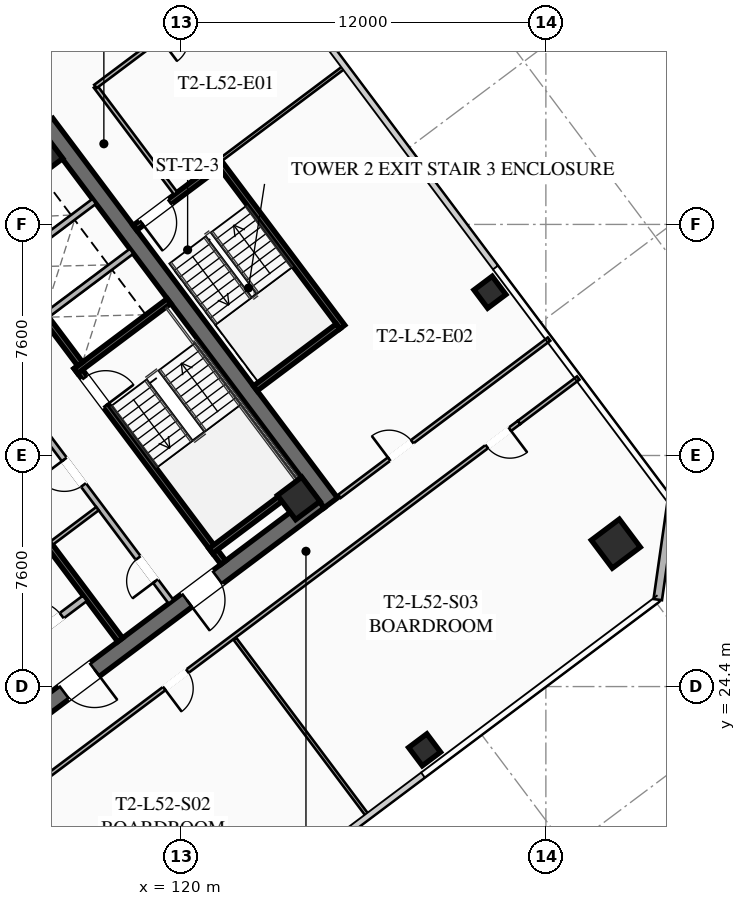
"""IFC4 building model, lengths in metres.
Left out: names, types, materials, properties, quantities, classifications, styles, units other than length and angle.
Written with IfcOpenShell. Run it as: python <this file> out.ifc"""

import sys

from ifc_helpers import new_model, si_unit, direction, frame, frame_2d, origin, origin_2d, place, context, subcontext, project, spatial, rectangle, hollow_rectangle, extrude, element, fill, save


model = new_model("IFC4")
c1 = context("Model", 3, precision=1e-05, world=origin(), true_north=direction((0.0, 1.0)))
c2 = subcontext(c1, "Body", "Model", "MODEL_VIEW")
j1 = project(units=[si_unit("LENGTHUNIT", "METRE"), si_unit("PLANEANGLEUNIT", "RADIAN")], contexts=[c1])
p1 = place(None, origin())
s1 = spatial("IfcSite", under=j1, at=p1, CompositionType="ELEMENT")
p2 = place(p1, origin())
s2 = spatial("IfcBuilding", under=s1, at=p2, CompositionType="ELEMENT")
p3 = place(p2, frame((0.0, 0.0, 192.5)))
s3 = spatial("IfcBuildingStorey", under=s2, at=p3, CompositionType="ELEMENT", Elevation=192.5)
p4 = place(p3, frame((115.564, 42.923, 0.0), z_axis=(0.0, 0.0, 1.0), x_axis=(0.600005007985, -0.799996243986, 0.0)))
e1 = element("IfcWall", 1, at=p4, inside=s3, PredefinedType="SHEAR", context=c2, shape_type="SweptSolid", body=[
    extrude(rectangle(XDim=15.6, YDim=0.55, at=frame_2d((7.8, 0.0))), origin(), (0.0, 0.0, 1.0), 3.55),
])
p5 = place(p3, frame((124.539, 30.498, 0.0), z_axis=(0.0, 0.0, 1.0), x_axis=(-0.799998054672, -0.600002593761, 0.0)))
e2 = element("IfcWall", 2, at=p5, inside=s3, PredefinedType="SHEAR", context=c2, shape_type="SweptSolid", body=[
    extrude(rectangle(XDim=15.06, YDim=0.55, at=frame_2d((7.53, 0.0))), origin(), (0.0, 0.0, 1.0), 3.55),
])
p6 = place(p5, frame((9.23, 0.0, 0.0)))
e3 = element("IfcOpeningElement", 3, at=p6, cuts=e2, PredefinedType="OPENING", context=c2, shape_type="SweptSolid", body=[
    extrude(rectangle(XDim=1.25, YDim=2.25, at=frame_2d((0.625, 1.125))), frame((0.0, 0.285, 0.0), z_axis=(0.0, -1.0, 0.0), x_axis=(1.0, 0.0, 0.0)), (0.0, 0.0, 1.0), 0.57),
])
p7 = place(p5, frame((4.18, 0.0, 0.0)))
e4 = element("IfcOpeningElement", 4, at=p7, cuts=e2, PredefinedType="OPENING", context=c2, shape_type="SweptSolid", body=[
    extrude(rectangle(XDim=1.25, YDim=2.25, at=frame_2d((0.625, 1.125))), frame((0.0, 0.285, 0.0), z_axis=(0.0, -1.0, 0.0), x_axis=(1.0, 0.0, 0.0)), (0.0, 0.0, 1.0), 0.57),
])
for number, where, z_axis, x_axis in (
    (5, (123.87, 30.59, 0.0), (0.0, 0.0, 1.0), (0.8, 0.6, 0.0)),
    (6, (115.41, 41.87, 0.0), (0.0, 0.0, 1.0), (0.8, 0.6, 0.0)),
):
    element("IfcColumn", number, at=place(p3, frame(where, z_axis=z_axis, x_axis=x_axis)), inside=s3, PredefinedType="COLUMN", context=c2, shape_type="SweptSolid", body=[
        extrude(hollow_rectangle(XDim=1.0, YDim=1.0, WallThickness=0.04, at=origin_2d()), origin(), (0.0, 0.0, 1.0), 3.37),
    ])
p8 = place(p3, frame((134.3, 29.1, 0.0), z_axis=(0.0, 0.0, 1.0), x_axis=(0.799999996291, 0.600000004945, 0.0)))
e7 = element("IfcColumn", 7, at=p8, inside=s3, PredefinedType="COLUMN", context=c2, shape_type="SweptSolid", body=[
    extrude(hollow_rectangle(XDim=1.15, YDim=1.15, WallThickness=0.045, at=origin_2d()), origin(), (0.0, 0.0, 1.0), 3.37),
])
for number, where, z_axis, x_axis in (
    (8, (128.01, 22.32, 0.0), (0.0, 0.0, 1.0), (0.8, 0.6, 0.0)),
    (9, (130.16, 37.37, 0.0), (0.0, 0.0, 1.0), (0.8, 0.6, 0.0)),
):
    element("IfcColumn", number, at=place(p3, frame(where, z_axis=z_axis, x_axis=x_axis)), inside=s3, PredefinedType="COLUMN", context=c2, shape_type="SweptSolid", body=[
        extrude(hollow_rectangle(XDim=0.75, YDim=0.75, WallThickness=0.032, at=origin_2d()), origin(), (0.0, 0.0, 1.0), 3.37),
    ])
p9 = place(p3, frame((136.14, 30.48, 0.0), z_axis=(0.0, 0.0, 1.0), x_axis=(-0.141410847992, -0.989950994782, 0.0)))
e10 = element("IfcWall", 10, at=p9, inside=s3, PredefinedType="SOLIDWALL", context=c2, shape_type="SweptSolid", body=[
    extrude(rectangle(XDim=3.253, YDim=0.28, at=frame_2d((1.626, 0.0))), origin(), (0.0, 0.0, 1.0), 3.37),
])
p10 = place(p3, frame((116.56, 34.92, 0.0), z_axis=(0.0, 0.0, 1.0), x_axis=(0.59999029481, -0.8000072788, 0.0)))
e11 = element("IfcWall", 11, at=p10, inside=s3, PredefinedType="SHEAR", context=c2, shape_type="SweptSolid", body=[
    extrude(rectangle(XDim=8.05, YDim=0.2, at=frame_2d((4.025, 0.0))), origin(), (0.0, 0.0, 1.0), 3.37),
])
p11 = place(p10, frame((0.45, 0.0, 0.0)))
e12 = element("IfcOpeningElement", 12, at=p11, cuts=e11, PredefinedType="OPENING", context=c2, shape_type="SweptSolid", body=[
    extrude(rectangle(XDim=1.15, YDim=2.2, at=frame_2d((0.575, 1.1))), frame((0.0, 0.11, 0.0), z_axis=(0.0, -1.0, 0.0), x_axis=(1.0, 0.0, 0.0)), (0.0, 0.0, 1.0), 0.22),
])
for number, where, z_axis, x_axis in (
    (13, (116.54, 34.78, 0.0), (0.0, 0.0, 1.0), (0.8, 0.6, 0.0)),
    (14, (120.98, 28.86, 0.0), (0.0, 0.0, 1.0), (0.8, 0.6, 0.0)),
):
    element("IfcWall", number, at=place(p3, frame(where, z_axis=z_axis, x_axis=x_axis)), inside=s3, PredefinedType="SHEAR", context=c2, shape_type="SweptSolid", body=[
        extrude(rectangle(XDim=3.83, YDim=0.2, at=frame_2d((1.915, 0.0))), origin(), (0.0, 0.0, 1.0), 3.37),
    ])
p12 = place(p3, frame((117.998, 25.936, 0.0), z_axis=(0.0, 0.0, 1.0), x_axis=(-0.600002693989, 0.799997979501, 0.0)))
e15 = element("IfcWall", 15, at=p12, inside=s3, PredefinedType="SHEAR", context=c2, shape_type="SweptSolid", body=[
    extrude(rectangle(XDim=14.5, YDim=0.2, at=frame_2d((7.25, 0.0))), origin(), (0.0, 0.0, 1.0), 3.37),
])
p13 = place(p3, frame((114.316, 25.412, 0.0), z_axis=(0.0, 0.0, 1.0), x_axis=(0.800018601094, 0.59997519774, 0.0)))
e16 = element("IfcWall", 16, at=p13, inside=s3, PredefinedType="SOLIDWALL", context=c2, shape_type="SweptSolid", body=[
    extrude(rectangle(XDim=3.15, YDim=0.22, at=frame_2d((1.575, 0.0))), origin(), (0.0, 0.0, 1.0), 2.723),
])
p14 = place(p13, frame((0.95, 0.0, 0.0)))
e17 = element("IfcOpeningElement", 17, at=p14, cuts=e16, PredefinedType="OPENING", context=c2, shape_type="SweptSolid", body=[
    extrude(rectangle(XDim=1.25, YDim=2.25, at=frame_2d((0.625, 1.125))), frame((0.0, 0.12, 0.0), z_axis=(0.0, -1.0, 0.0), x_axis=(1.0, 0.0, 0.0)), (0.0, 0.0, 1.0), 0.24),
])
p15 = place(p3, frame((112.81, 40.17, 0.0), z_axis=(0.0, 0.0, 1.0), x_axis=(0.599993943644, -0.800004542231, 0.0)))
e18 = element("IfcWall", 18, at=p15, inside=s3, PredefinedType="SHEAR", context=c2, shape_type="SweptSolid", body=[
    extrude(rectangle(XDim=6.45, YDim=0.2, at=frame_2d((3.225, 0.0))), origin(), (0.0, 0.0, 1.0), 3.37),
])
for number, where, z_axis, x_axis in (
    (19, (115.59, 36.63, 0.0), (0.0, 0.0, 1.0), (0.8, 0.6, 0.0)),
    (20, (114.36, 38.27, 0.0), (0.0, 0.0, 1.0), (0.8, 0.6, 0.0)),
):
    element("IfcWall", number, at=place(p3, frame(where, z_axis=z_axis, x_axis=x_axis)), inside=s3, PredefinedType="SOLIDWALL", context=c2, shape_type="SweptSolid", body=[
        extrude(rectangle(XDim=3.48, YDim=0.2, at=frame_2d((1.74, 0.0))), origin(), (0.0, 0.0, 1.0), 3.37),
    ])
p16 = place(p3, frame((119.67, 27.19, 0.0), z_axis=(0.0, 0.0, 1.0), x_axis=(-0.599988677396, 0.800008491828, 0.0)))
e21 = element("IfcWall", 21, at=p16, inside=s3, PredefinedType="SOLIDWALL", context=c2, shape_type="SweptSolid", body=[
    extrude(rectangle(XDim=6.9, YDim=0.2, at=frame_2d((3.45, 0.0))), origin(), (0.0, 0.0, 1.0), 2.723),
])
p17 = place(p16, frame((0.85, 0.0, 0.0)))
e22 = element("IfcOpeningElement", 22, at=p17, cuts=e21, PredefinedType="OPENING", context=c2, shape_type="SweptSolid", body=[
    extrude(rectangle(XDim=0.95, YDim=2.05, at=frame_2d((0.475, 1.025))), frame((0.0, 0.11, 0.0), z_axis=(0.0, -1.0, 0.0), x_axis=(1.0, 0.0, 0.0)), (0.0, 0.0, 1.0), 0.22),
])
p18 = place(p16, frame((4.8, 0.0, 0.0)))
e23 = element("IfcOpeningElement", 23, at=p18, cuts=e21, PredefinedType="OPENING", context=c2, shape_type="SweptSolid", body=[
    extrude(rectangle(XDim=1.05, YDim=2.2, at=frame_2d((0.525, 1.1))), frame((0.0, 0.11, 0.0), z_axis=(0.0, -1.0, 0.0), x_axis=(1.0, 0.0, 0.0)), (0.0, 0.0, 1.0), 0.22),
])
p19 = place(p3, frame((115.746, 29.122, 0.0), z_axis=(0.0, 0.0, 1.0), x_axis=(0.8, 0.6, 0.0)))
e24 = element("IfcWall", 24, at=p19, inside=s3, PredefinedType="PARTITIONING", context=c2, shape_type="SweptSolid", body=[
    extrude(rectangle(XDim=1.88, YDim=0.135, at=frame_2d((0.94, 0.0))), origin(), (0.0, 0.0, 1.0), 2.723),
])
p20 = place(p3, frame((125.304, 36.228, 0.0), z_axis=(0.0, 0.0, 1.0), x_axis=(-0.59998851072, 0.800008616831, 0.0)))
e25 = element("IfcWall", 25, at=p20, inside=s3, PredefinedType="SHEAR", context=c2, shape_type="SweptSolid", body=[
    extrude(rectangle(XDim=6.8, YDim=0.2, at=frame_2d((3.4, 0.0))), origin(), (0.0, 0.0, 1.0), 3.37),
])
p21 = place(p3, frame((121.204, 41.528, 0.0), z_axis=(0.0, 0.0, 1.0), x_axis=(-0.800017232136, -0.599977023131, 0.0)))
e26 = element("IfcWall", 26, at=p21, inside=s3, PredefinedType="SHEAR", context=c2, shape_type="SweptSolid", body=[
    extrude(rectangle(XDim=3.4, YDim=0.2, at=frame_2d((1.7, 0.0))), origin(), (0.0, 0.0, 1.0), 3.37),
])
p22 = place(p21, frame((1.975, 0.0, 0.0)))
e27 = element("IfcOpeningElement", 27, at=p22, cuts=e26, PredefinedType="OPENING", context=c2, shape_type="SweptSolid", body=[
    extrude(rectangle(XDim=1.15, YDim=2.2, at=frame_2d((0.575, 1.1))), frame((0.0, 0.11, 0.0), z_axis=(0.0, -1.0, 0.0), x_axis=(1.0, 0.0, 0.0)), (0.0, 0.0, 1.0), 0.22),
])
p23 = place(p3, frame((122.444, 34.208, 0.0), z_axis=(0.0, 0.0, 1.0), x_axis=(0.79999138319, 0.600011488909, 0.0)))
e28 = element("IfcWall", 28, at=p23, inside=s3, PredefinedType="SHEAR", context=c2, shape_type="SweptSolid", body=[
    extrude(rectangle(XDim=3.4, YDim=0.2, at=frame_2d((1.7, 0.0))), origin(), (0.0, 0.0, 1.0), 3.37),
])
p24 = place(p3, frame((119.824, 40.618, 0.0), z_axis=(0.0, 0.0, 1.0), x_axis=(-0.599982243973, 0.800013316712, 0.0)))
e29 = element("IfcWall", 29, at=p24, inside=s3, PredefinedType="PARTITIONING", context=c2, shape_type="SweptSolid", body=[
    extrude(rectangle(XDim=4.4, YDim=0.135, at=frame_2d((2.2, 0.0))), origin(), (0.0, 0.0, 1.0), 2.723),
])
p25 = place(p3, frame((96.718, 31.126, 0.0), z_axis=(0.0, 0.0, 1.0), x_axis=(0.8, 0.6, 0.0)))
e30 = element("IfcWall", 30, at=p25, inside=s3, PredefinedType="PARTITIONING", context=c2, shape_type="SweptSolid", body=[
    extrude(rectangle(XDim=28.7, YDim=0.135, at=frame_2d((14.35, 0.0))), origin(), (0.0, 0.0, 1.0), 2.723),
])
p26 = place(p25, frame((0.3, 0.0, 0.0)))
e31 = element("IfcOpeningElement", 31, at=p26, cuts=e30, PredefinedType="OPENING", context=c2, shape_type="SweptSolid", body=[
    extrude(rectangle(XDim=0.95, YDim=2.05, at=frame_2d((0.475, 1.025))), frame((0.0, 0.077, 0.0), z_axis=(0.0, -1.0, 0.0), x_axis=(1.0, 0.0, 0.0)), (0.0, 0.0, 1.0), 0.155),
])
p27 = place(p25, frame((14.138, 0.0, 0.0)))
e32 = element("IfcOpeningElement", 32, at=p27, cuts=e30, PredefinedType="OPENING", context=c2, shape_type="SweptSolid", body=[
    extrude(rectangle(XDim=0.95, YDim=2.05, at=frame_2d((0.475, 1.025))), frame((0.0, 0.077, 0.0), z_axis=(0.0, -1.0, 0.0), x_axis=(1.0, 0.0, 0.0)), (0.0, 0.0, 1.0), 0.155),
])
p28 = place(p25, frame((27.45, 0.0, 0.0)))
e33 = element("IfcOpeningElement", 33, at=p28, cuts=e30, PredefinedType="OPENING", context=c2, shape_type="SweptSolid", body=[
    extrude(rectangle(XDim=0.95, YDim=2.05, at=frame_2d((0.475, 1.025))), frame((0.0, 0.077, 0.0), z_axis=(0.0, -1.0, 0.0), x_axis=(1.0, 0.0, 0.0)), (0.0, 0.0, 1.0), 0.155),
])
p29 = place(p3, frame((131.12, 33.09, 0.0), z_axis=(0.0, 0.0, 1.0), x_axis=(-0.800003062365, -0.599995916825, 0.0)))
e34 = element("IfcWall", 34, at=p29, inside=s3, PredefinedType="PARTITIONING", context=c2, shape_type="SweptSolid", body=[
    extrude(rectangle(XDim=28.7, YDim=0.135, at=frame_2d((14.35, 0.0))), origin(), (0.0, 0.0, 1.0), 2.723),
])
p30 = place(p29, frame((27.37, 0.0, 0.0)))
e35 = element("IfcOpeningElement", 35, at=p30, cuts=e34, PredefinedType="OPENING", context=c2, shape_type="SweptSolid", body=[
    extrude(rectangle(XDim=0.95, YDim=2.05, at=frame_2d((0.475, 1.025))), frame((0.0, 0.077, 0.0), z_axis=(0.0, -1.0, 0.0), x_axis=(1.0, 0.0, 0.0)), (0.0, 0.0, 1.0), 0.155),
])
p31 = place(p29, frame((13.638, 0.0, 0.0)))
e36 = element("IfcOpeningElement", 36, at=p31, cuts=e34, PredefinedType="OPENING", context=c2, shape_type="SweptSolid", body=[
    extrude(rectangle(XDim=0.95, YDim=2.05, at=frame_2d((0.475, 1.025))), frame((0.0, 0.077, 0.0), z_axis=(0.0, -1.0, 0.0), x_axis=(1.0, 0.0, 0.0)), (0.0, 0.0, 1.0), 0.155),
])
p32 = place(p29, frame((0.38, 0.0, 0.0)))
e37 = element("IfcOpeningElement", 37, at=p32, cuts=e34, PredefinedType="OPENING", context=c2, shape_type="SweptSolid", body=[
    extrude(rectangle(XDim=0.95, YDim=2.05, at=frame_2d((0.475, 1.025))), frame((0.0, 0.077, 0.0), z_axis=(0.0, -1.0, 0.0), x_axis=(1.0, 0.0, 0.0)), (0.0, 0.0, 1.0), 0.155),
])
p33 = place(p3, frame((131.12, 33.09, 0.0), z_axis=(0.0, 0.0, 1.0), x_axis=(0.799975885537, 0.600032151272, 0.0)))
e38 = element("IfcWall", 38, at=p33, inside=s3, PredefinedType="PARTITIONING", context=c2, shape_type="SweptSolid", body=[
    extrude(rectangle(XDim=2.43, YDim=0.135, at=frame_2d((1.215, 0.0))), origin(), (0.0, 0.0, 1.0), 2.723),
])
p34 = place(p3, frame((118.948, 14.736, 0.0), z_axis=(0.0, 0.0, 1.0), x_axis=(-0.6, 0.8, 0.0)))
e39 = element("IfcWall", 39, at=p34, inside=s3, PredefinedType="PARTITIONING", context=c2, shape_type="SweptSolid", body=[
    extrude(rectangle(XDim=7.3, YDim=0.11, at=frame_2d((3.65, 0.0))), origin(), (0.0, 0.0, 1.0), 2.723),
])
p35 = place(p3, frame((126.148, 20.136, 0.0), z_axis=(0.0, 0.0, 1.0), x_axis=(-0.599983946797, 0.800012039651, 0.0)))
e40 = element("IfcWall", 40, at=p35, inside=s3, PredefinedType="PARTITIONING", context=c2, shape_type="SweptSolid", body=[
    extrude(rectangle(XDim=7.3, YDim=0.11, at=frame_2d((3.65, 0.0))), origin(), (0.0, 0.0, 1.0), 2.723),
])
p36 = place(p3, frame((122.744, 48.308, 0.0), z_axis=(0.0, 0.0, 1.0), x_axis=(-0.79997892247, -0.600028102345, 0.0)))
e41 = element("IfcWall", 41, at=p36, inside=s3, PredefinedType="PARTITIONING", context=c2, shape_type="SweptSolid", body=[
    extrude(rectangle(XDim=6.95, YDim=0.135, at=frame_2d((3.475, 0.0))), origin(), (0.0, 0.0, 1.0), 2.723),
])
p37 = place(p36, frame((3.35, 0.0, 0.0)))
e42 = element("IfcOpeningElement", 42, at=p37, cuts=e41, PredefinedType="OPENING", context=c2, shape_type="SweptSolid", body=[
    extrude(rectangle(XDim=0.95, YDim=2.05, at=frame_2d((0.475, 1.025))), frame((0.0, 0.077, 0.0), z_axis=(0.0, -1.0, 0.0), x_axis=(1.0, 0.0, 0.0)), (0.0, 0.0, 1.0), 0.155),
])
p38 = place(p3, frame((125.208, 30.656, 0.0), z_axis=(0.0, 0.0, 1.0), x_axis=(0.800006797429, 0.599990936654, 0.0)))
e43 = element("IfcWall", 43, at=p38, inside=s3, PredefinedType="PARTITIONING", context=c2, shape_type="SweptSolid", body=[
    extrude(rectangle(XDim=8.62, YDim=0.135, at=frame_2d((4.31, 0.0))), origin(), (0.0, 0.0, 1.0), 2.723),
])
p39 = place(p38, frame((2.045, 0.0, 0.0)))
e44 = element("IfcOpeningElement", 44, at=p39, cuts=e43, PredefinedType="OPENING", context=c2, shape_type="SweptSolid", body=[
    extrude(rectangle(XDim=0.95, YDim=2.05, at=frame_2d((0.475, 1.025))), frame((0.0, 0.077, 0.0), z_axis=(0.0, -1.0, 0.0), x_axis=(1.0, 0.0, 0.0)), (0.0, 0.0, 1.0), 0.155),
])
p40 = place(p3, frame((125.384, 44.788, 0.0), z_axis=(0.0, 0.0, 1.0), x_axis=(-0.8, -0.6, 0.0)))
e45 = element("IfcWall", 45, at=p40, inside=s3, PredefinedType="PARTITIONING", context=c2, shape_type="SweptSolid", body=[
    extrude(rectangle(XDim=5.1, YDim=0.11, at=frame_2d((2.55, 0.0))), origin(), (0.0, 0.0, 1.0), 2.723),
])
p41 = place(p6, origin())
e46 = element("IfcDoor", 46, at=p41, inside=s3, OperationType="SINGLE_SWING_LEFT", PredefinedType="DOOR", context=c2, shape_type="SweptSolid", body=[
    extrude(rectangle(XDim=1.25, YDim=2.25, at=frame_2d((0.625, 1.125))), frame((0.0, 0.025, 0.0), z_axis=(0.0, -1.0, 0.0), x_axis=(1.0, 0.0, 0.0)), (0.0, 0.0, 1.0), 0.05),
])
fill(e3, e46)
p42 = place(p7, origin())
e47 = element("IfcDoor", 47, at=p42, inside=s3, OperationType="SINGLE_SWING_RIGHT", PredefinedType="DOOR", context=c2, shape_type="SweptSolid", body=[
    extrude(rectangle(XDim=1.25, YDim=2.25, at=frame_2d((0.625, 1.125))), frame((0.0, 0.025, 0.0), z_axis=(0.0, -1.0, 0.0), x_axis=(1.0, 0.0, 0.0)), (0.0, 0.0, 1.0), 0.05),
])
fill(e4, e47)
p43 = place(p11, origin())
e48 = element("IfcDoor", 48, at=p43, inside=s3, OperationType="SINGLE_SWING_RIGHT", PredefinedType="DOOR", context=c2, shape_type="SweptSolid", body=[
    extrude(rectangle(XDim=1.15, YDim=2.2, at=frame_2d((0.575, 1.1))), frame((0.0, 0.025, 0.0), z_axis=(0.0, -1.0, 0.0), x_axis=(1.0, 0.0, 0.0)), (0.0, 0.0, 1.0), 0.05),
])
fill(e12, e48)
p44 = place(p14, origin())
e49 = element("IfcDoor", 49, at=p44, inside=s3, OperationType="SINGLE_SWING_LEFT", PredefinedType="DOOR", context=c2, shape_type="SweptSolid", body=[
    extrude(rectangle(XDim=1.25, YDim=2.25, at=frame_2d((0.625, 1.125))), frame((0.0, 0.025, 0.0), z_axis=(0.0, -1.0, 0.0), x_axis=(1.0, 0.0, 0.0)), (0.0, 0.0, 1.0), 0.05),
])
fill(e17, e49)
p45 = place(p17, origin())
e50 = element("IfcDoor", 50, at=p45, inside=s3, OperationType="SINGLE_SWING_LEFT", PredefinedType="DOOR", context=c2, shape_type="SweptSolid", body=[
    extrude(rectangle(XDim=0.95, YDim=2.05, at=frame_2d((0.475, 1.025))), frame((0.0, 0.025, 0.0), z_axis=(0.0, -1.0, 0.0), x_axis=(1.0, 0.0, 0.0)), (0.0, 0.0, 1.0), 0.05),
])
fill(e22, e50)
p46 = place(p18, origin())
e51 = element("IfcDoor", 51, at=p46, inside=s3, OperationType="SINGLE_SWING_RIGHT", PredefinedType="DOOR", context=c2, shape_type="SweptSolid", body=[
    extrude(rectangle(XDim=1.05, YDim=2.2, at=frame_2d((0.525, 1.1))), frame((0.0, 0.025, 0.0), z_axis=(0.0, -1.0, 0.0), x_axis=(1.0, 0.0, 0.0)), (0.0, 0.0, 1.0), 0.05),
])
fill(e23, e51)
p47 = place(p22, origin())
e52 = element("IfcDoor", 52, at=p47, inside=s3, OperationType="SINGLE_SWING_RIGHT", PredefinedType="DOOR", context=c2, shape_type="SweptSolid", body=[
    extrude(rectangle(XDim=1.15, YDim=2.2, at=frame_2d((0.575, 1.1))), frame((0.0, 0.025, 0.0), z_axis=(0.0, -1.0, 0.0), x_axis=(1.0, 0.0, 0.0)), (0.0, 0.0, 1.0), 0.05),
])
fill(e27, e52)
p48 = place(p31, origin())
e53 = element("IfcDoor", 53, at=p48, inside=s3, OperationType="SINGLE_SWING_RIGHT", PredefinedType="DOOR", context=c2, shape_type="SweptSolid", body=[
    extrude(rectangle(XDim=0.95, YDim=2.05, at=frame_2d((0.475, 1.025))), frame((0.0, 0.025, 0.0), z_axis=(0.0, -1.0, 0.0), x_axis=(1.0, 0.0, 0.0)), (0.0, 0.0, 1.0), 0.05),
])
fill(e36, e53)
p49 = place(p32, origin())
e54 = element("IfcDoor", 54, at=p49, inside=s3, OperationType="SINGLE_SWING_LEFT", PredefinedType="DOOR", context=c2, shape_type="SweptSolid", body=[
    extrude(rectangle(XDim=0.95, YDim=2.05, at=frame_2d((0.475, 1.025))), frame((0.0, 0.025, 0.0), z_axis=(0.0, -1.0, 0.0), x_axis=(1.0, 0.0, 0.0)), (0.0, 0.0, 1.0), 0.05),
])
fill(e37, e54)
p50 = place(p39, origin())
e55 = element("IfcDoor", 55, at=p50, inside=s3, OperationType="SINGLE_SWING_LEFT", PredefinedType="DOOR", context=c2, shape_type="SweptSolid", body=[
    extrude(rectangle(XDim=0.95, YDim=2.05, at=frame_2d((0.475, 1.025))), frame((0.0, 0.025, 0.0), z_axis=(0.0, -1.0, 0.0), x_axis=(1.0, 0.0, 0.0)), (0.0, 0.0, 1.0), 0.05),
])
fill(e44, e55)
save(model, sys.argv[1])
